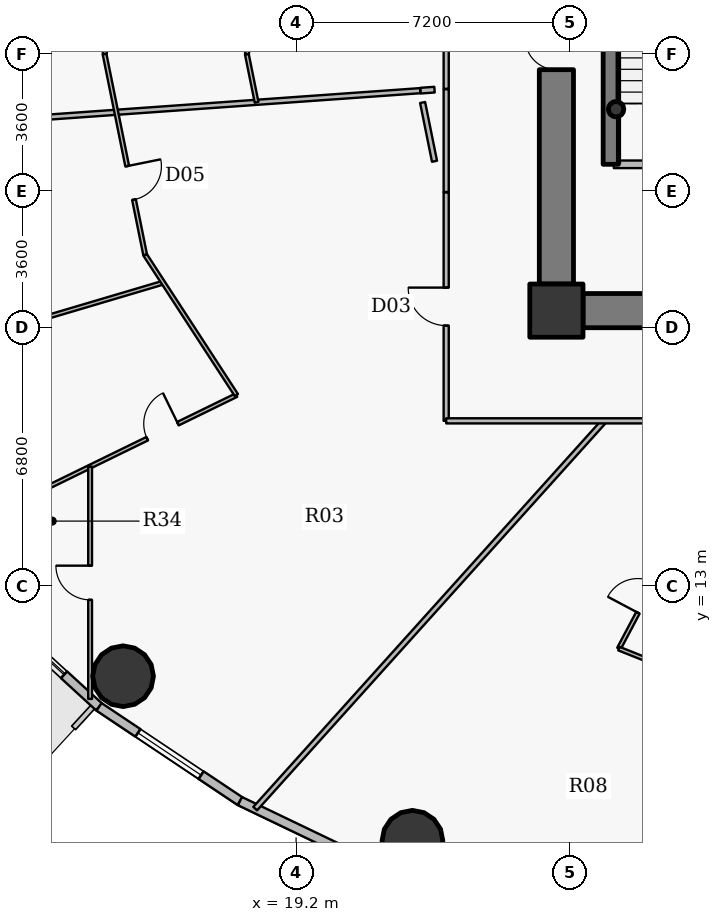
"""IFC4 building model, lengths in metres.
Left out: names, types, materials, properties, quantities, classifications, styles, units other than length and angle.
Written with IfcOpenShell. Run it as: python <this file> out.ifc"""

import sys

from ifc_helpers import new_model, si_unit, direction, frame, frame_2d, origin, origin_2d, place, context, subcontext, project, spatial, rectangle, hollow_circle, extrude, source, transform, mapped, element, fill, save


model = new_model("IFC4")
c1 = context("Model", 3, precision=1e-05, world=origin(), true_north=direction((0.0, 1.0)))
c2 = subcontext(c1, "Body", "Model", "MODEL_VIEW")
j1 = project(units=[si_unit("LENGTHUNIT", "METRE"), si_unit("PLANEANGLEUNIT", "RADIAN")], contexts=[c1])
p1 = place(None, origin())
s1 = spatial("IfcSite", under=j1, at=p1, CompositionType="ELEMENT")
p2 = place(p1, origin())
s2 = spatial("IfcBuilding", under=s1, at=p2, CompositionType="ELEMENT")
p3 = place(p2, frame((0.0, 0.0, 66.0)))
s3 = spatial("IfcBuildingStorey", under=s2, at=p3, CompositionType="ELEMENT", Elevation=66.0)
p4 = place(p3, frame((26.05, 20.25, 0.0), z_axis=(0.0, 0.0, 1.0), x_axis=(1.0, 0.0, 0.0)))
e1 = element("IfcColumn", 1, at=p4, inside=s3, PredefinedType="COLUMN", context=c2, shape_type="SweptSolid", body=[
    extrude(rectangle(XDim=1.4, YDim=1.4, at=origin_2d()), origin(), (0.0, 0.0, 1.0), 4.2),
])
p5 = place(p3, frame((27.48, 24.1, 0.0), z_axis=(0.0, 0.0, 1.0), x_axis=(0.0, 1.0, 0.0)))
e2 = element("IfcWall", 2, at=p5, inside=s3, PredefinedType="SHEAR", context=c2, shape_type="SweptSolid", body=[
    extrude(rectangle(XDim=8.6, YDim=0.4, at=frame_2d((4.3, 0.0))), origin(), (0.0, 0.0, 1.0), 4.2),
])
p6 = place(p3, frame((27.62, 25.55, 0.0), z_axis=(0.0, 0.0, 1.0), x_axis=(1.0, 0.0, 0.0)))
e3 = element("IfcColumn", 3, at=p6, inside=s3, PredefinedType="COLUMN", context=c2, shape_type="SweptSolid", body=[
    extrude(hollow_circle(Radius=0.203, WallThickness=0.016, at=origin_2d()), origin(), (0.0, 0.0, 1.0), 4.2),
])
p7 = place(p3, frame((45.25, 20.25, 0.0), z_axis=(0.0, 0.0, 1.0), x_axis=(-1.0, 0.0, 0.0)))
e4 = element("IfcWall", 4, at=p7, inside=s3, PredefinedType="SHEAR", context=c2, shape_type="SweptSolid", body=[
    extrude(rectangle(XDim=18.5, YDim=0.9, at=frame_2d((9.25, 0.0))), origin(), (0.0, 0.0, 1.0), 3.4),
])
p8 = place(p7, frame((10.0, 0.0, 0.0)))
e5 = element("IfcOpeningElement", 5, at=p8, cuts=e4, PredefinedType="OPENING", context=c2, shape_type="SweptSolid", body=[
    extrude(rectangle(XDim=1.15, YDim=2.15, at=origin_2d()), frame((0.575, 0.46, 1.075), z_axis=(0.0, -1.0, 0.0), x_axis=(1.0, 0.0, 0.0)), (0.0, 0.0, 1.0), 0.92),
])
p9 = place(p3, frame((26.05, 20.95, 0.0), z_axis=(0.0, 0.0, 1.0), x_axis=(0.0, 1.0, 0.0)))
e6 = element("IfcWall", 6, at=p9, inside=s3, PredefinedType="SHEAR", context=c2, shape_type="SweptSolid", body=[
    extrude(rectangle(XDim=12.1, YDim=0.9, at=frame_2d((6.05, 0.0))), origin(), (0.0, 0.0, 1.0), 3.4),
])
p10 = place(p9, frame((5.64, 0.0, 0.0)))
e7 = element("IfcOpeningElement", 7, at=p10, cuts=e6, PredefinedType="OPENING", context=c2, shape_type="SweptSolid", body=[
    extrude(rectangle(XDim=0.82, YDim=2.1, at=origin_2d()), frame((0.41, 0.46, 1.05), z_axis=(0.0, -1.0, 0.0), x_axis=(1.0, 0.0, 0.0)), (0.0, 0.0, 1.0), 0.92),
])
for number, where, z_axis, x_axis in (
    (8, (14.647, 10.631, 0.0), (0.0, 0.0, 1.0), (1.0, 0.0, 0.0)),
    (9, (22.262, 6.301, 0.0), (0.0, 0.0, 1.0), (1.0, 0.0, 0.0)),
):
    element("IfcColumn", number, at=place(p3, frame(where, z_axis=z_axis, x_axis=x_axis)), inside=s3, PredefinedType="COLUMN", context=c2, shape_type="SweptSolid", body=[
        extrude(hollow_circle(Radius=0.8, WallThickness=0.045, at=origin_2d()), origin(), (0.0, 0.0, 1.0), 4.2),
    ])
p11 = place(p3, frame((14.015, 9.824, 0.0), z_axis=(0.0, 0.0, 1.0), x_axis=(-0.737116376281, 0.67576582321, 0.0)))
e10 = element("IfcWall", 10, at=p11, inside=s3, PredefinedType="SOLIDWALL", context=c2, shape_type="SweptSolid", body=[
    extrude(rectangle(XDim=4.294, YDim=0.24, at=frame_2d((2.147, 0.0))), origin(), (0.0, 0.0, 1.0), 3.95),
])
p12 = place(p11, frame((1.25, 0.0, 0.9)))
e11 = element("IfcOpeningElement", 11, at=p12, cuts=e10, PredefinedType="OPENING", context=c2, shape_type="SweptSolid", body=[
    extrude(rectangle(XDim=1.25, YDim=1.65, at=origin_2d()), frame((0.625, 0.13, 0.825), z_axis=(0.0, -1.0, 0.0), x_axis=(1.0, 0.0, 0.0)), (0.0, 0.0, 1.0), 0.26),
])
p13 = place(p3, frame((17.723, 7.344, 0.0), z_axis=(0.0, 0.0, 1.0), x_axis=(-0.831240982525, 0.555912249343, 0.0)))
e12 = element("IfcWall", 12, at=p13, inside=s3, PredefinedType="SOLIDWALL", context=c2, shape_type="SweptSolid", body=[
    extrude(rectangle(XDim=4.46, YDim=0.24, at=frame_2d((2.23, 0.0))), origin(), (0.0, 0.0, 1.0), 3.95),
])
p14 = place(p13, frame((1.23, 0.0, 0.9)))
e13 = element("IfcOpeningElement", 13, at=p14, cuts=e12, PredefinedType="OPENING", context=c2, shape_type="SweptSolid", body=[
    extrude(rectangle(XDim=2.0, YDim=1.75, at=origin_2d()), frame((1.0, 0.13, 0.875), z_axis=(0.0, -1.0, 0.0), x_axis=(1.0, 0.0, 0.0)), (0.0, 0.0, 1.0), 0.26),
])
p15 = place(p3, frame((21.882, 5.349, 0.0), z_axis=(0.0, 0.0, 1.0), x_axis=(-0.901601503137, 0.432567601123, 0.0)))
e14 = element("IfcWall", 14, at=p15, inside=s3, PredefinedType="SOLIDWALL", context=c2, shape_type="SweptSolid", body=[
    extrude(rectangle(XDim=4.613, YDim=0.24, at=frame_2d((2.306, 0.0))), origin(), (0.0, 0.0, 1.0), 3.95),
])
p16 = place(p3, frame((5.141, 24.805, 0.0), z_axis=(0.0, 0.0, 1.0), x_axis=(0.99748069861, 0.070938395112, 0.0)))
e15 = element("IfcWall", 15, at=p16, inside=s3, PredefinedType="PARTITIONING", context=c2, shape_type="SweptSolid", body=[
    extrude(rectangle(XDim=17.37, YDim=0.135, at=frame_2d((8.685, 0.0))), origin(), (0.0, 0.0, 1.0), 3.335),
])
p17 = place(p3, frame((7.012, 18.411, 0.0), z_axis=(0.0, 0.0, 1.0), x_axis=(0.958797025861, 0.284091997775, 0.0)))
e16 = element("IfcWall", 16, at=p17, inside=s3, PredefinedType="PARTITIONING", context=c2, shape_type="SweptSolid", body=[
    extrude(rectangle(XDim=9.065, YDim=0.1, at=frame_2d((4.532, 0.0))), origin(), (0.0, 0.0, 1.0), 3.335),
])
p18 = place(p3, frame((9.719, 14.163, 0.0), z_axis=(0.0, 0.0, 1.0), x_axis=(0.898526567573, 0.438919135339, 0.0)))
e17 = element("IfcWall", 17, at=p18, inside=s3, PredefinedType="PARTITIONING", context=c2, shape_type="SweptSolid", body=[
    extrude(rectangle(XDim=8.803, YDim=0.1, at=frame_2d((4.402, 0.0))), origin(), (0.0, 0.0, 1.0), 3.335),
])
p19 = place(p18, frame((6.191, 0.0, 0.0)))
e18 = element("IfcOpeningElement", 18, at=p19, cuts=e17, PredefinedType="OPENING", context=c2, shape_type="SweptSolid", body=[
    extrude(rectangle(XDim=0.9, YDim=2.1, at=origin_2d()), frame((0.45, 0.06, 1.05), z_axis=(0.0, -1.0, 0.0), x_axis=(1.0, 0.0, 0.0)), (0.0, 0.0, 1.0), 0.12),
])
p20 = place(p18, frame((0.843, 0.0, 0.0)))
e19 = element("IfcOpeningElement", 19, at=p20, cuts=e17, PredefinedType="OPENING", context=c2, shape_type="SweptSolid", body=[
    extrude(rectangle(XDim=0.82, YDim=2.1, at=origin_2d()), frame((0.41, 0.06, 1.05), z_axis=(0.0, -1.0, 0.0), x_axis=(1.0, 0.0, 0.0)), (0.0, 0.0, 1.0), 0.12),
])
p21 = place(p3, frame((13.78, 10.033, 0.0), z_axis=(0.0, 0.0, 1.0), x_axis=(0.0, 1.0, 0.0)))
e20 = element("IfcWall", 20, at=p21, inside=s3, PredefinedType="PARTITIONING", context=c2, shape_type="SweptSolid", body=[
    extrude(rectangle(XDim=6.114, YDim=0.1, at=frame_2d((3.057, 0.0))), origin(), (0.0, 0.0, 1.0), 3.335),
])
p22 = place(p21, frame((2.607, 0.0, 0.0)))
e21 = element("IfcOpeningElement", 21, at=p22, cuts=e20, PredefinedType="OPENING", context=c2, shape_type="SweptSolid", body=[
    extrude(rectangle(XDim=0.9, YDim=2.1, at=origin_2d()), frame((0.45, 0.06, 1.05), z_axis=(0.0, -1.0, 0.0), x_axis=(1.0, 0.0, 0.0)), (0.0, 0.0, 1.0), 0.12),
])
p23 = place(p3, frame((14.16, 27.0, 0.0), z_axis=(0.0, 0.0, 1.0), x_axis=(0.198288618329, 0.980143675101, 0.0)))
e22 = element("IfcWall", 22, at=p23, inside=s3, PredefinedType="PARTITIONING", context=c2, shape_type="SweptSolid", body=[
    extrude(rectangle(XDim=3.781, YDim=0.1, at=frame_2d((1.891, 0.0))), origin(), (0.0, 0.0, 1.0), 3.285),
])
p24 = place(p23, frame((1.44, 0.0, 0.0)))
e23 = element("IfcOpeningElement", 23, at=p24, cuts=e22, PredefinedType="OPENING", context=c2, shape_type="SweptSolid", body=[
    extrude(rectangle(XDim=0.9, YDim=2.1, at=origin_2d()), frame((0.45, 0.06, 1.05), z_axis=(0.0, -1.0, 0.0), x_axis=(1.0, 0.0, 0.0)), (0.0, 0.0, 1.0), 0.12),
])
p25 = place(p3, frame((14.16, 27.0, 0.0), z_axis=(0.0, 0.0, 1.0), x_axis=(0.198292702032, -0.980142848936, 0.0)))
e24 = element("IfcWall", 24, at=p25, inside=s3, PredefinedType="PARTITIONING", context=c2, shape_type="SweptSolid", body=[
    extrude(rectangle(XDim=5.392, YDim=0.1, at=frame_2d((2.696, 0.0))), origin(), (0.0, 0.0, 1.0), 3.285),
])
p26 = place(p25, frame((3.007, 0.0, 0.0)))
e25 = element("IfcOpeningElement", 25, at=p26, cuts=e24, PredefinedType="OPENING", context=c2, shape_type="SweptSolid", body=[
    extrude(rectangle(XDim=0.9, YDim=2.1, at=origin_2d()), frame((0.45, 0.06, 1.05), z_axis=(0.0, -1.0, 0.0), x_axis=(1.0, 0.0, 0.0)), (0.0, 0.0, 1.0), 0.12),
])
p27 = place(p3, frame((15.229, 21.716, 0.0), z_axis=(0.0, 0.0, 1.0), x_axis=(0.545423102052, -0.838160867464, 0.0)))
e26 = element("IfcWall", 26, at=p27, inside=s3, PredefinedType="PARTITIONING", context=c2, shape_type="SweptSolid", body=[
    extrude(rectangle(XDim=4.401, YDim=0.1, at=frame_2d((2.2, 0.0))), origin(), (0.0, 0.0, 1.0), 3.285),
])
p28 = place(p3, frame((17.904, 27.0, 0.0), z_axis=(0.0, 0.0, 1.0), x_axis=(0.198255955876, -0.980150282334, 0.0)))
e27 = element("IfcWall", 27, at=p28, inside=s3, PredefinedType="PARTITIONING", context=c2, shape_type="SweptSolid", body=[
    extrude(rectangle(XDim=1.294, YDim=0.1, at=frame_2d((0.647, 0.0))), origin(), (0.0, 0.0, 1.0), 3.285),
])
p29 = place(p3, frame((17.904, 27.0, 0.0), z_axis=(0.0, 0.0, 1.0), x_axis=(0.198258794433, 0.980149708172, 0.0)))
e28 = element("IfcWall", 28, at=p29, inside=s3, PredefinedType="PARTITIONING", context=c2, shape_type="SweptSolid", body=[
    extrude(rectangle(XDim=3.133, YDim=0.1, at=frame_2d((1.566, 0.0))), origin(), (0.0, 0.0, 1.0), 3.285),
])
p30 = place(p3, frame((18.124, 7.146, 0.0), z_axis=(0.0, 0.0, 1.0), x_axis=(0.669125827692, 0.743149128181, 0.0)))
e29 = element("IfcWall", 29, at=p30, inside=s3, PredefinedType="PARTITIONING", context=c2, shape_type="SweptSolid", body=[
    extrude(rectangle(XDim=13.73, YDim=0.135, at=frame_2d((6.865, 0.0))), origin(), (0.0, 0.0, 1.0), 3.335),
])
p31 = place(p3, frame((23.15, 17.35, 0.0), z_axis=(0.0, 0.0, 1.0), x_axis=(0.0, 1.0, 0.0)))
e30 = element("IfcWall", 30, at=p31, inside=s3, PredefinedType="PARTITIONING", context=c2, shape_type="SweptSolid", body=[
    extrude(rectangle(XDim=6.011, YDim=0.135, at=frame_2d((3.006, 0.0))), origin(), (0.0, 0.0, 1.0), 3.285),
])
p32 = place(p31, frame((2.506, 0.0, 0.0)))
e31 = element("IfcOpeningElement", 31, at=p32, cuts=e30, PredefinedType="OPENING", context=c2, shape_type="SweptSolid", body=[
    extrude(rectangle(XDim=1.0, YDim=2.15, at=origin_2d()), frame((0.5, 0.078, 1.075), z_axis=(0.0, -1.0, 0.0), x_axis=(1.0, 0.0, 0.0)), (0.0, 0.0, 1.0), 0.155),
])
p33 = place(p3, frame((23.15, 17.35, 0.0), z_axis=(0.0, 0.0, 1.0), x_axis=(1.0, 0.0, 0.0)))
e32 = element("IfcWall", 32, at=p33, inside=s3, PredefinedType="PARTITIONING", context=c2, shape_type="SweptSolid", body=[
    extrude(rectangle(XDim=10.456, YDim=0.135, at=frame_2d((5.228, 0.0))), origin(), (0.0, 0.0, 1.0), 3.285),
])
p34 = place(p33, frame((5.444, 0.0, 0.0)))
e33 = element("IfcOpeningElement", 33, at=p34, cuts=e32, PredefinedType="OPENING", context=c2, shape_type="SweptSolid", body=[
    extrude(rectangle(XDim=1.0, YDim=2.15, at=origin_2d()), frame((0.5, 0.078, 1.075), z_axis=(0.0, -1.0, 0.0), x_axis=(1.0, 0.0, 0.0)), (0.0, 0.0, 1.0), 0.155),
])
p35 = place(p3, frame((23.15, 26.086, 0.0), z_axis=(0.0, 0.0, 1.0), x_axis=(0.0, 1.0, 0.0)))
e34 = element("IfcWall", 34, at=p35, inside=s3, PredefinedType="PARTITIONING", context=c2, shape_type="SweptSolid", body=[
    extrude(rectangle(XDim=10.564, YDim=0.135, at=frame_2d((5.282, 0.0))), origin(), (0.0, 0.0, 1.0), 3.285),
])
p36 = place(p35, frame((4.403, 0.0, 0.0)))
e35 = element("IfcOpeningElement", 35, at=p36, cuts=e34, PredefinedType="OPENING", context=c2, shape_type="SweptSolid", body=[
    extrude(rectangle(XDim=1.0, YDim=2.15, at=origin_2d()), frame((0.5, 0.078, 1.075), z_axis=(0.0, -1.0, 0.0), x_axis=(1.0, 0.0, 0.0)), (0.0, 0.0, 1.0), 0.155),
])
p37 = place(p3, frame((27.56, 24.1, 0.0), z_axis=(0.0, 0.0, 1.0), x_axis=(1.0, 0.0, 0.0)))
e36 = element("IfcWall", 36, at=p37, inside=s3, PredefinedType="PARTITIONING", context=c2, shape_type="SweptSolid", body=[
    extrude(rectangle(XDim=3.54, YDim=0.2, at=frame_2d((1.77, 0.0))), origin(), (0.0, 0.0, 1.0), 3.95),
])
p38 = place(p37, frame((1.17, 0.0, 0.0)))
e37 = element("IfcOpeningElement", 37, at=p38, cuts=e36, PredefinedType="OPENING", context=c2, shape_type="SweptSolid", body=[
    extrude(rectangle(XDim=1.2, YDim=2.15, at=origin_2d()), frame((0.6, 0.11, 1.075), z_axis=(0.0, -1.0, 0.0), x_axis=(1.0, 0.0, 0.0)), (0.0, 0.0, 1.0), 0.22),
])
p39 = place(p3, frame((27.694, 11.357, 0.0), z_axis=(0.0, 0.0, 1.0), x_axis=(0.468918098925, 0.883241652381, 0.0)))
e38 = element("IfcWall", 38, at=p39, inside=s3, PredefinedType="PARTITIONING", context=c2, shape_type="SweptSolid", body=[
    extrude(rectangle(XDim=3.036, YDim=0.1, at=frame_2d((1.518, 0.0))), origin(), (0.0, 0.0, 1.0), 3.95),
])
p40 = place(p39, frame((1.068, 0.0, 0.0)))
e39 = element("IfcOpeningElement", 39, at=p40, cuts=e38, PredefinedType="OPENING", context=c2, shape_type="SweptSolid", body=[
    extrude(rectangle(XDim=0.9, YDim=2.1, at=origin_2d()), frame((0.45, 0.06, 1.05), z_axis=(0.0, -1.0, 0.0), x_axis=(1.0, 0.0, 0.0)), (0.0, 0.0, 1.0), 0.12),
])
p41 = place(p3, frame((27.694, 11.357, 0.0), z_axis=(0.0, 0.0, 1.0), x_axis=(0.928847957875, -0.370461160112, 0.0)))
e40 = element("IfcWall", 40, at=p41, inside=s3, PredefinedType="PARTITIONING", context=c2, shape_type="SweptSolid", body=[
    extrude(rectangle(XDim=1.676, YDim=0.1, at=frame_2d((0.838, 0.0))), origin(), (0.0, 0.0, 1.0), 3.95),
])
p42 = place(p3, frame((23.15, 23.372, 0.0), z_axis=(0.0, 0.0, 1.0), x_axis=(0.0, 1.0, 0.0)))
e41 = element("IfcWall", 41, at=p42, inside=s3, PredefinedType="PARTITIONING", context=c2, shape_type="SweptSolid", body=[
    extrude(rectangle(XDim=2.705, YDim=0.135, at=frame_2d((1.352, 0.0))), origin(), (0.0, 0.0, 1.0), 3.285),
])
p43 = place(p3, frame((25.6, 20.94, 0.0), z_axis=(0.0, 0.0, 1.0), x_axis=(0.0, -1.0, 0.0)))
e42 = element("IfcWall", 42, at=p43, inside=s3, PredefinedType="PARTITIONING", context=c2, shape_type="SweptSolid", body=[
    extrude(rectangle(XDim=1.14, YDim=0.135, at=frame_2d((0.57, 0.0))), origin(), (0.0, 0.0, 1.0), 3.95),
])
p44 = place(p3, frame((25.907, 19.8, 0.0), z_axis=(0.0, 0.0, 1.0), x_axis=(1.0, 0.0, 0.0)))
e43 = element("IfcWall", 43, at=p44, inside=s3, PredefinedType="PARTITIONING", context=c2, shape_type="SweptSolid", body=[
    extrude(rectangle(XDim=0.833, YDim=0.135, at=frame_2d((0.416, 0.0))), origin(), (0.0, 0.0, 1.0), 3.285),
])
p45 = place(p3, frame((22.843, 26.064, 0.0), z_axis=(0.0, 0.0, 1.0), x_axis=(-0.997509116352, -0.070537669335, 0.0)))
e44 = element("IfcWall", 44, at=p45, inside=s3, PredefinedType="PARTITIONING", context=c2, shape_type="SweptSolid", body=[
    extrude(rectangle(XDim=0.367, YDim=0.15, at=frame_2d((0.184, 0.0))), origin(), (0.0, 0.0, 1.0), 3.95),
])
p46 = place(p3, frame((22.53, 25.726, 0.0), z_axis=(0.0, 0.0, 1.0), x_axis=(0.198347121698, -0.980131837721, 0.0)))
e45 = element("IfcWall", 45, at=p46, inside=s3, PredefinedType="PARTITIONING", context=c2, shape_type="SweptSolid", body=[
    extrude(rectangle(XDim=1.578, YDim=0.135, at=frame_2d((0.789, 0.0))), origin(), (0.0, 0.0, 1.0), 3.95),
])
m1 = source(origin(), c2, "Body", "SweptSolid", [
    extrude(rectangle(XDim=1.25, YDim=1.65, at=origin_2d()), frame((0.625, 0.03, 0.825), z_axis=(0.0, -1.0, 0.0), x_axis=(1.0, 0.0, 0.0)), (0.0, 0.0, 1.0), 0.06),
])
p47 = place(p12, origin())
e46 = element("IfcWindow", 46, at=p47, inside=s3, PartitioningType="SINGLE_PANEL", PredefinedType="WINDOW", context=c2, shape_type="MappedRepresentation", body=[
    mapped(m1, transform((0.0, 0.0, 0.0), x_axis=(1.0, 0.0, 0.0), y_axis=(0.0, 1.0, 0.0), z_axis=(0.0, 0.0, 1.0), scale=1.0)),
])
fill(e11, e46)
m2 = source(origin(), c2, "Body", "SweptSolid", [
    extrude(rectangle(XDim=2.0, YDim=1.75, at=origin_2d()), frame((1.0, 0.03, 0.875), z_axis=(0.0, -1.0, 0.0), x_axis=(1.0, 0.0, 0.0)), (0.0, 0.0, 1.0), 0.06),
])
p48 = place(p14, origin())
e47 = element("IfcWindow", 47, at=p48, inside=s3, PartitioningType="DOUBLE_PANEL_VERTICAL", PredefinedType="WINDOW", context=c2, shape_type="MappedRepresentation", body=[
    mapped(m2, transform((0.0, 0.0, 0.0), x_axis=(1.0, 0.0, 0.0), y_axis=(0.0, 1.0, 0.0), z_axis=(0.0, 0.0, 1.0), scale=1.0)),
])
fill(e13, e47)
m3 = source(origin(), c2, "Body", "SweptSolid", [
    extrude(rectangle(XDim=0.82, YDim=2.1, at=origin_2d()), frame((0.41, 0.025, 1.05), z_axis=(0.0, -1.0, 0.0), x_axis=(1.0, 0.0, 0.0)), (0.0, 0.0, 1.0), 0.05),
])
p49 = place(p10, origin())
e48 = element("IfcDoor", 48, at=p49, inside=s3, OperationType="SINGLE_SWING_RIGHT", PredefinedType="DOOR", context=c2, shape_type="MappedRepresentation", body=[
    mapped(m3, transform((0.0, 0.0, 0.0), x_axis=(1.0, 0.0, 0.0), y_axis=(0.0, 1.0, 0.0), z_axis=(0.0, 0.0, 1.0), scale=1.0)),
])
fill(e7, e48)
m4 = source(origin(), c2, "Body", "SweptSolid", [
    extrude(rectangle(XDim=1.0, YDim=2.15, at=origin_2d()), frame((0.5, 0.025, 1.075), z_axis=(0.0, -1.0, 0.0), x_axis=(1.0, 0.0, 0.0)), (0.0, 0.0, 1.0), 0.05),
])
p50 = place(p32, origin())
e49 = element("IfcDoor", 49, at=p50, inside=s3, OperationType="SINGLE_SWING_RIGHT", PredefinedType="DOOR", context=c2, shape_type="MappedRepresentation", body=[
    mapped(m4, transform((0.0, 0.0, 0.0), x_axis=(1.0, 0.0, 0.0), y_axis=(0.0, 1.0, 0.0), z_axis=(0.0, 0.0, 1.0), scale=1.0)),
])
fill(e31, e49)
m5 = source(origin(), c2, "Body", "SweptSolid", [
    extrude(rectangle(XDim=0.9, YDim=2.1, at=origin_2d()), frame((0.45, 0.025, 1.05), z_axis=(0.0, -1.0, 0.0), x_axis=(1.0, 0.0, 0.0)), (0.0, 0.0, 1.0), 0.05),
])
p51 = place(p26, origin())
e50 = element("IfcDoor", 50, at=p51, inside=s3, OperationType="SINGLE_SWING_LEFT", PredefinedType="DOOR", context=c2, shape_type="MappedRepresentation", body=[
    mapped(m5, transform((0.0, 0.0, 0.0), x_axis=(1.0, 0.0, 0.0), y_axis=(0.0, 1.0, 0.0), z_axis=(0.0, 0.0, 1.0), scale=1.0)),
])
fill(e25, e50)
p52 = place(p19, origin())
e51 = element("IfcDoor", 51, at=p52, inside=s3, OperationType="SINGLE_SWING_RIGHT", PredefinedType="DOOR", context=c2, shape_type="MappedRepresentation", body=[
    mapped(m5, transform((0.0, 0.0, 0.0), x_axis=(1.0, 0.0, 0.0), y_axis=(0.0, 1.0, 0.0), z_axis=(0.0, 0.0, 1.0), scale=1.0)),
])
fill(e18, e51)
p53 = place(p22, origin())
e52 = element("IfcDoor", 52, at=p53, inside=s3, OperationType="SINGLE_SWING_RIGHT", PredefinedType="DOOR", context=c2, shape_type="MappedRepresentation", body=[
    mapped(m5, transform((0.0, 0.0, 0.0), x_axis=(1.0, 0.0, 0.0), y_axis=(0.0, 1.0, 0.0), z_axis=(0.0, 0.0, 1.0), scale=1.0)),
])
fill(e21, e52)
p54 = place(p40, origin())
e53 = element("IfcDoor", 53, at=p54, inside=s3, OperationType="SINGLE_SWING_LEFT", PredefinedType="DOOR", context=c2, shape_type="MappedRepresentation", body=[
    mapped(m5, transform((0.0, 0.0, 0.0), x_axis=(1.0, 0.0, 0.0), y_axis=(0.0, 1.0, 0.0), z_axis=(0.0, 0.0, 1.0), scale=1.0)),
])
fill(e39, e53)
save(model, sys.argv[1])
